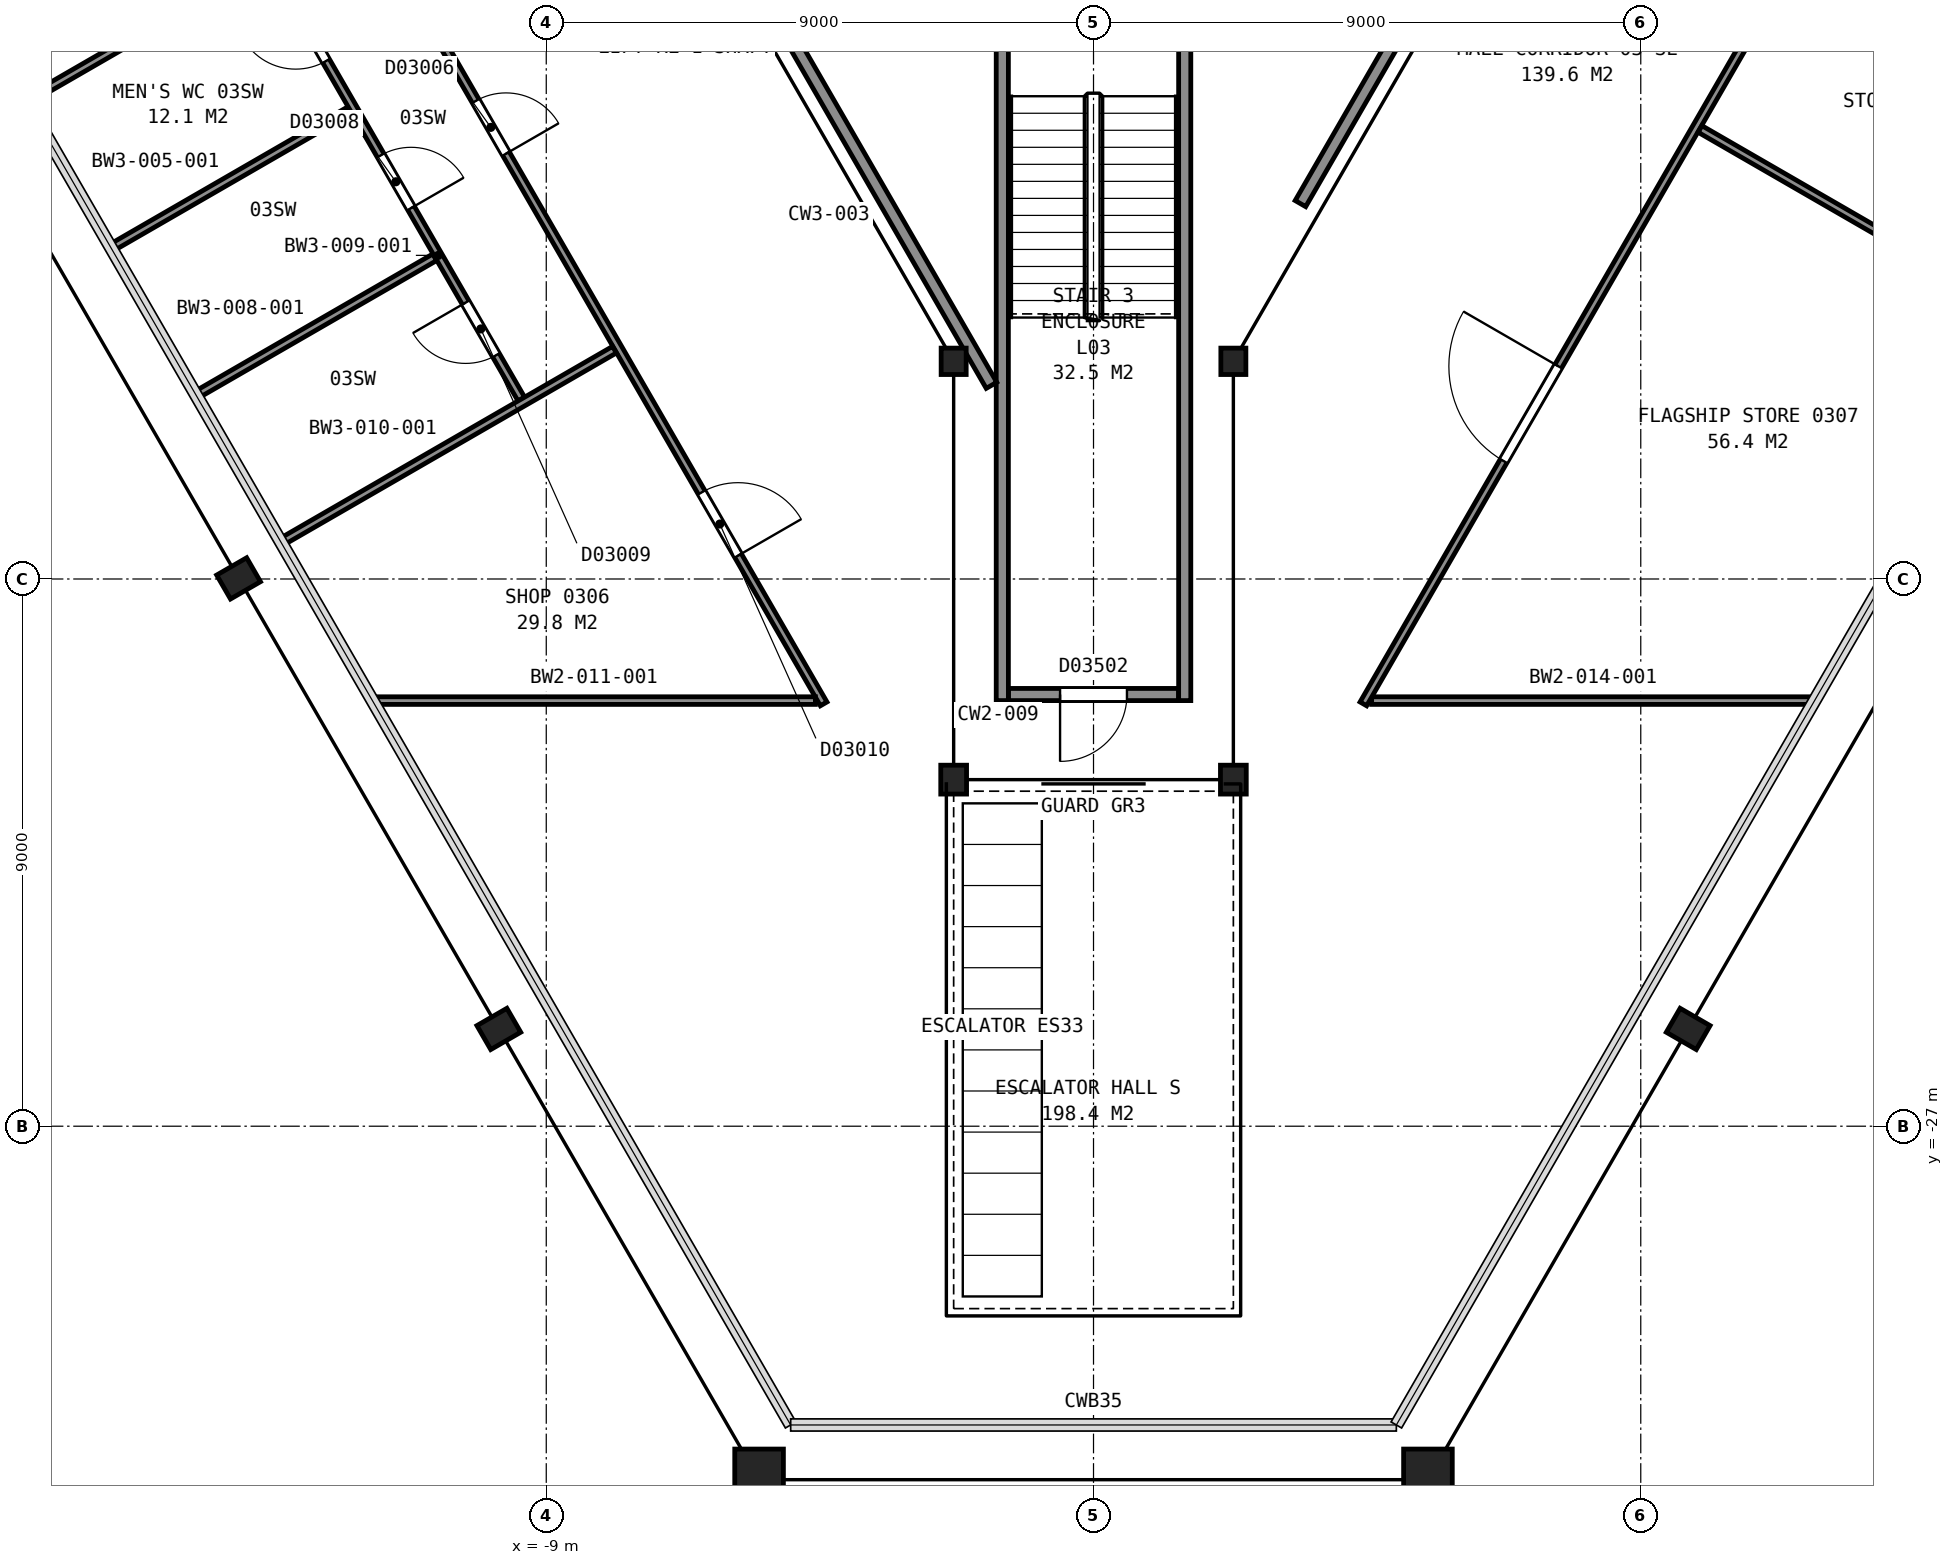
"""IFC4 building model, lengths in metres.
Left out: names, types, materials, properties, quantities, classifications, styles, units other than length and angle.
Written with IfcOpenShell. Run it as: python <this file> out.ifc"""

import sys

from ifc_helpers import new_model, si_unit, direction, frame, frame_2d, origin, origin_2d, place, context, subcontext, project, spatial, rectangle, hollow_rectangle, i_section, extrude, element, fill, save


model = new_model("IFC4")
c1 = context("Model", 3, precision=1e-05, world=origin(), true_north=direction((0.0, 1.0)))
c2 = subcontext(c1, "Body", "Model", "MODEL_VIEW")
j1 = project(units=[si_unit("LENGTHUNIT", "METRE"), si_unit("PLANEANGLEUNIT", "RADIAN")], contexts=[c1])
p1 = place(None, origin())
s1 = spatial("IfcSite", under=j1, at=p1, CompositionType="ELEMENT")
p2 = place(p1, origin())
s2 = spatial("IfcBuilding", under=s1, at=p2, CompositionType="ELEMENT")
p3 = place(p2, frame((0.0, 0.0, 22.4)))
s3 = spatial("IfcBuildingStorey", under=s2, at=p3, CompositionType="ELEMENT", Elevation=22.4)
for number, where, z_axis, x_axis in (
    (1, (-14.06, -17.99, 0.0), (0.0, 0.0, 1.0), (-0.5, 0.866, 0.0)),
    (2, (-9.78, -25.4, 0.0), (0.0, 0.0, 1.0), (-0.5, 0.866, 0.0)),
):
    element("IfcColumn", number, at=place(p3, frame(where, z_axis=z_axis, x_axis=x_axis)), inside=s3, PredefinedType="COLUMN", context=c2, shape_type="SweptSolid", body=[
        extrude(i_section(OverallWidth=0.455, OverallDepth=0.569, WebThickness=0.078, FlangeThickness=0.125, FilletRadius=0.015, at=origin_2d()), origin(), (0.0, 0.0, 1.0), 4.8),
    ])
for number, where, z_axis, x_axis in (
    (3, (-5.5, -32.81, 0.0), (0.0, 0.0, 1.0), (-1.0, 0.0, 0.0)),
    (4, (5.5, -32.81, 0.0), (0.0, 0.0, 1.0), (-1.0, 0.0, 0.0)),
):
    element("IfcColumn", number, at=place(p3, frame(where, z_axis=z_axis, x_axis=x_axis)), inside=s3, PredefinedType="COLUMN", context=c2, shape_type="SweptSolid", body=[
        extrude(hollow_rectangle(XDim=0.8, YDim=1.0, WallThickness=0.075, at=origin_2d()), origin(), (0.0, 0.0, 1.0), 4.8),
    ])
p4 = place(p3, frame((9.78, -25.4, 0.0), z_axis=(0.0, 0.0, 1.0), x_axis=(-0.5, -0.866025403784, 0.0)))
e5 = element("IfcColumn", 5, at=p4, inside=s3, PredefinedType="COLUMN", context=c2, shape_type="SweptSolid", body=[
    extrude(i_section(OverallWidth=0.455, OverallDepth=0.569, WebThickness=0.078, FlangeThickness=0.125, FilletRadius=0.015, at=origin_2d()), origin(), (0.0, 0.0, 1.0), 4.8),
])
p5 = place(p3, frame((-2.3, -14.42, 0.0), z_axis=(0.0, 0.0, 1.0), x_axis=(1.0, 0.0, 0.0)))
e6 = element("IfcColumn", 6, at=p5, inside=s3, PredefinedType="COLUMN", context=c2, shape_type="SweptSolid", body=[
    extrude(i_section(OverallWidth=0.411, OverallDepth=0.434, WebThickness=0.036, FlangeThickness=0.057, FilletRadius=0.015, at=origin_2d()), origin(), (0.0, 0.0, 1.0), 4.8),
])
for number, where, z_axis, x_axis in (
    (7, (-2.3, -21.3, 0.0), (0.0, 0.0, 1.0), (-1.0, 0.0, 0.0)),
    (8, (2.3, -21.3, 0.0), (0.0, 0.0, 1.0), (-1.0, 0.0, 0.0)),
):
    element("IfcColumn", number, at=place(p3, frame(where, z_axis=z_axis, x_axis=x_axis)), inside=s3, PredefinedType="COLUMN", context=c2, shape_type="SweptSolid", body=[
        extrude(i_section(OverallWidth=0.424, OverallDepth=0.475, WebThickness=0.048, FlangeThickness=0.077, FilletRadius=0.015, at=origin_2d()), origin(), (0.0, 0.0, 1.0), 4.8),
    ])
p6 = place(p3, frame((2.3, -14.42, 0.0), z_axis=(0.0, 0.0, 1.0), x_axis=(1.0, 0.0, 0.0)))
e9 = element("IfcColumn", 9, at=p6, inside=s3, PredefinedType="COLUMN", context=c2, shape_type="SweptSolid", body=[
    extrude(i_section(OverallWidth=0.411, OverallDepth=0.434, WebThickness=0.036, FlangeThickness=0.057, FilletRadius=0.015, at=origin_2d()), origin(), (0.0, 0.0, 1.0), 4.8),
])
p7 = place(p3, frame((-1.4, -19.9, 0.0), z_axis=(0.0, 0.0, 1.0), x_axis=(1.0, 0.0, 0.0)))
e10 = element("IfcWall", 10, at=p7, inside=s3, PredefinedType="PARTITIONING", context=c2, shape_type="SweptSolid", body=[
    extrude(rectangle(XDim=2.8, YDim=0.2, at=frame_2d((1.4, 0.0))), origin(), (0.0, 0.0, 1.0), 4.55),
])
p8 = place(p7, frame((0.85, 0.0, 0.0)))
e11 = element("IfcOpeningElement", 11, at=p8, cuts=e10, PredefinedType="OPENING", context=c2, shape_type="SweptSolid", body=[
    extrude(rectangle(XDim=1.1, YDim=2.1, at=frame_2d((0.55, 1.05))), frame((0.0, 0.11, 0.0), z_axis=(0.0, -1.0, 0.0), x_axis=(1.0, 0.0, 0.0)), (0.0, 0.0, 1.0), 0.22),
])
for number, where, z_axis, x_axis in (
    (12, (1.5, -8.0, 0.0), (0.0, 0.0, 1.0), (0.0, -1.0, 0.0)),
    (13, (-1.5, -8.0, 0.0), (0.0, 0.0, 1.0), (0.0, -1.0, 0.0)),
):
    element("IfcWall", number, at=place(p3, frame(where, z_axis=z_axis, x_axis=x_axis)), inside=s3, PredefinedType="PARTITIONING", context=c2, shape_type="SweptSolid", body=[
        extrude(rectangle(XDim=12.0, YDim=0.2, at=frame_2d((6.0, 0.0))), origin(), (0.0, 0.0, 1.0), 4.55),
    ])
p9 = place(p3, frame((-4.914, -9.208, 0.0), z_axis=(0.0, 0.0, 1.0), x_axis=(0.499947703927, -0.866055594831, 0.0)))
e14 = element("IfcWall", 14, at=p9, inside=s3, PredefinedType="PARTITIONING", context=c2, shape_type="SweptSolid", body=[
    extrude(rectangle(XDim=6.474, YDim=0.2, at=frame_2d((3.237, 0.0))), origin(), (0.0, 0.0, 1.0), 4.55),
])
p10 = place(p3, frame((3.403, -11.826, 0.0), z_axis=(0.0, 0.0, 1.0), x_axis=(0.499990831429, 0.866030697196, 0.0)))
e15 = element("IfcWall", 15, at=p10, inside=s3, PredefinedType="PARTITIONING", context=c2, shape_type="SweptSolid", body=[
    extrude(rectangle(XDim=20.526, YDim=0.2, at=frame_2d((10.263, 0.0))), origin(), (0.0, 0.0, 1.0), 4.55),
])
p11 = place(p10, frame((10.0, 0.0, 0.0)))
e16 = element("IfcOpeningElement", 16, at=p11, cuts=e15, PredefinedType="OPENING", context=c2, shape_type="SweptSolid", body=[
    extrude(rectangle(XDim=1.8, YDim=2.1, at=frame_2d((0.9, 1.05))), frame((0.0, 0.11, 0.0), z_axis=(0.0, -1.0, 0.0), x_axis=(1.0, 0.0, 0.0)), (0.0, 0.0, 1.0), 0.22),
])
p12 = place(p3, frame((-4.438, -20.054, 0.0), z_axis=(0.0, 0.0, 1.0), x_axis=(-0.499994028088, 0.866028851642, 0.0)))
e17 = element("IfcWall", 17, at=p12, inside=s3, PredefinedType="PARTITIONING", context=c2, shape_type="SweptSolid", body=[
    extrude(rectangle(XDim=30.297, YDim=0.125, at=frame_2d((15.148, 0.0))), origin(), (0.0, 0.0, 1.0), 3.653),
])
p13 = place(p12, frame((26.285, 0.0, 0.0)))
e18 = element("IfcOpeningElement", 18, at=p13, cuts=e17, PredefinedType="OPENING", context=c2, shape_type="SweptSolid", body=[
    extrude(rectangle(XDim=1.2, YDim=2.1, at=frame_2d((0.6, 1.05))), frame((0.0, 0.073, 0.0), z_axis=(0.0, -1.0, 0.0), x_axis=(1.0, 0.0, 0.0)), (0.0, 0.0, 1.0), 0.145),
])
p14 = place(p12, frame((18.731, 0.0, 0.0)))
e19 = element("IfcOpeningElement", 19, at=p14, cuts=e17, PredefinedType="OPENING", context=c2, shape_type="SweptSolid", body=[
    extrude(rectangle(XDim=1.2, YDim=2.1, at=frame_2d((0.6, 1.05))), frame((0.0, 0.073, 0.0), z_axis=(0.0, -1.0, 0.0), x_axis=(1.0, 0.0, 0.0)), (0.0, 0.0, 1.0), 0.145),
])
p15 = place(p12, frame((10.449, 0.0, 0.0)))
e20 = element("IfcOpeningElement", 20, at=p15, cuts=e17, PredefinedType="OPENING", context=c2, shape_type="SweptSolid", body=[
    extrude(rectangle(XDim=1.0, YDim=2.1, at=frame_2d((0.5, 1.05))), frame((0.0, 0.073, 0.0), z_axis=(0.0, -1.0, 0.0), x_axis=(1.0, 0.0, 0.0)), (0.0, 0.0, 1.0), 0.145),
])
p16 = place(p12, frame((2.816, 0.0, 0.0)))
e21 = element("IfcOpeningElement", 21, at=p16, cuts=e17, PredefinedType="OPENING", context=c2, shape_type="SweptSolid", body=[
    extrude(rectangle(XDim=1.2, YDim=2.1, at=frame_2d((0.6, 1.05))), frame((0.0, 0.073, 0.0), z_axis=(0.0, -1.0, 0.0), x_axis=(1.0, 0.0, 0.0)), (0.0, 0.0, 1.0), 0.145),
])
p17 = place(p3, frame((-17.554, -10.135, 0.0), z_axis=(0.0, 0.0, 1.0), x_axis=(0.866003371142, 0.500038159714, 0.0)))
e22 = element("IfcWall", 22, at=p17, inside=s3, PredefinedType="PARTITIONING", context=c2, shape_type="SweptSolid", body=[
    extrude(rectangle(XDim=6.337, YDim=0.125, at=frame_2d((3.168, 0.0))), origin(), (0.0, 0.0, 1.0), 3.653),
])
p18 = place(p3, frame((-16.157, -12.555, 0.0), z_axis=(0.0, 0.0, 1.0), x_axis=(0.866009042838, 0.50002833692, 0.0)))
e23 = element("IfcWall", 23, at=p18, inside=s3, PredefinedType="PARTITIONING", context=c2, shape_type="SweptSolid", body=[
    extrude(rectangle(XDim=4.537, YDim=0.125, at=frame_2d((2.269, 0.0))), origin(), (0.0, 0.0, 1.0), 4.64),
])
p19 = place(p3, frame((-14.76, -14.975, 0.0), z_axis=(0.0, 0.0, 1.0), x_axis=(0.866030417568, 0.499991315771, 0.0)))
e24 = element("IfcWall", 24, at=p19, inside=s3, PredefinedType="PARTITIONING", context=c2, shape_type="SweptSolid", body=[
    extrude(rectangle(XDim=4.533, YDim=0.125, at=frame_2d((2.266, 0.0))), origin(), (0.0, 0.0, 1.0), 4.64),
])
p20 = place(p3, frame((-9.41, -15.041, 0.0), z_axis=(0.0, 0.0, 1.0), x_axis=(-0.500068128175, 0.865986066391, 0.0)))
e25 = element("IfcWall", 25, at=p20, inside=s3, PredefinedType="PARTITIONING", context=c2, shape_type="SweptSolid", body=[
    extrude(rectangle(XDim=8.253, YDim=0.125, at=frame_2d((4.126, 0.0))), origin(), (0.0, 0.0, 1.0), 4.64),
])
p21 = place(p20, frame((6.421, 0.0, 0.0)))
e26 = element("IfcOpeningElement", 26, at=p21, cuts=e25, PredefinedType="OPENING", context=c2, shape_type="SweptSolid", body=[
    extrude(rectangle(XDim=1.0, YDim=2.1, at=frame_2d((0.5, 1.05))), frame((0.0, 0.073, 0.0), z_axis=(0.0, -1.0, 0.0), x_axis=(1.0, 0.0, 0.0)), (0.0, 0.0, 1.0), 0.145),
])
p22 = place(p20, frame((3.627, 0.0, 0.0)))
e27 = element("IfcOpeningElement", 27, at=p22, cuts=e25, PredefinedType="OPENING", context=c2, shape_type="SweptSolid", body=[
    extrude(rectangle(XDim=1.0, YDim=2.1, at=frame_2d((0.5, 1.05))), frame((0.0, 0.073, 0.0), z_axis=(0.0, -1.0, 0.0), x_axis=(1.0, 0.0, 0.0)), (0.0, 0.0, 1.0), 0.145),
])
p23 = place(p20, frame((0.832, 0.0, 0.0)))
e28 = element("IfcOpeningElement", 28, at=p23, cuts=e25, PredefinedType="OPENING", context=c2, shape_type="SweptSolid", body=[
    extrude(rectangle(XDim=1.0, YDim=2.1, at=frame_2d((0.5, 1.05))), frame((0.0, 0.073, 0.0), z_axis=(0.0, -1.0, 0.0), x_axis=(1.0, 0.0, 0.0)), (0.0, 0.0, 1.0), 0.145),
])
p24 = place(p3, frame((-13.363, -17.395, 0.0), z_axis=(0.0, 0.0, 1.0), x_axis=(0.866044997331, 0.499966061446, 0.0)))
e29 = element("IfcWall", 29, at=p24, inside=s3, PredefinedType="PARTITIONING", context=c2, shape_type="SweptSolid", body=[
    extrude(rectangle(XDim=6.333, YDim=0.125, at=frame_2d((3.167, 0.0))), origin(), (0.0, 0.0, 1.0), 3.653),
])
for number, where, z_axis, x_axis in (
    (30, (-11.859, -20.0, 0.0), (0.0, 0.0, 1.0), (1.0, 0.0, 0.0)),
    (31, (4.574, -20.0, 0.0), (0.0, 0.0, 1.0), (1.0, 0.0, 0.0)),
):
    element("IfcWall", number, at=place(p3, frame(where, z_axis=z_axis, x_axis=x_axis)), inside=s3, PredefinedType="PARTITIONING", context=c2, shape_type="SweptSolid", body=[
        extrude(rectangle(XDim=7.285, YDim=0.125, at=frame_2d((3.643, 0.0))), origin(), (0.0, 0.0, 1.0), 4.64),
    ])
p25 = place(p3, frame((19.586, 6.184, 0.0), z_axis=(0.0, 0.0, 1.0), x_axis=(-0.499994028088, -0.866028851642, 0.0)))
e32 = element("IfcWall", 32, at=p25, inside=s3, PredefinedType="PARTITIONING", context=c2, shape_type="SweptSolid", body=[
    extrude(rectangle(XDim=30.297, YDim=0.125, at=frame_2d((15.148, 0.0))), origin(), (0.0, 0.0, 1.0), 3.653),
])
p26 = place(p25, frame((23.885, 0.0, 0.0)))
e33 = element("IfcOpeningElement", 33, at=p26, cuts=e32, PredefinedType="OPENING", context=c2, shape_type="SweptSolid", body=[
    extrude(rectangle(XDim=1.8, YDim=2.4, at=frame_2d((0.9, 1.2))), frame((0.0, 0.073, 0.0), z_axis=(0.0, -1.0, 0.0), x_axis=(1.0, 0.0, 0.0)), (0.0, 0.0, 1.0), 0.145),
])
p27 = place(p25, frame((16.741, 0.0, 0.0)))
e34 = element("IfcOpeningElement", 34, at=p27, cuts=e32, PredefinedType="OPENING", context=c2, shape_type="SweptSolid", body=[
    extrude(rectangle(XDim=1.0, YDim=2.1, at=frame_2d((0.5, 1.05))), frame((0.0, 0.073, 0.0), z_axis=(0.0, -1.0, 0.0), x_axis=(1.0, 0.0, 0.0)), (0.0, 0.0, 1.0), 0.145),
])
p28 = place(p25, frame((10.349, 0.0, 0.0)))
e35 = element("IfcOpeningElement", 35, at=p28, cuts=e32, PredefinedType="OPENING", context=c2, shape_type="SweptSolid", body=[
    extrude(rectangle(XDim=1.2, YDim=2.1, at=frame_2d((0.6, 1.05))), frame((0.0, 0.073, 0.0), z_axis=(0.0, -1.0, 0.0), x_axis=(1.0, 0.0, 0.0)), (0.0, 0.0, 1.0), 0.145),
])
p29 = place(p25, frame((2.817, 0.0, 0.0)))
e36 = element("IfcOpeningElement", 36, at=p29, cuts=e32, PredefinedType="OPENING", context=c2, shape_type="SweptSolid", body=[
    extrude(rectangle(XDim=1.2, YDim=2.1, at=frame_2d((0.6, 1.05))), frame((0.0, 0.073, 0.0), z_axis=(0.0, -1.0, 0.0), x_axis=(1.0, 0.0, 0.0)), (0.0, 0.0, 1.0), 0.145),
])
p30 = place(p3, frame((9.974, -10.599, 0.0), z_axis=(0.0, 0.0, 1.0), x_axis=(0.866044997331, -0.499966061446, 0.0)))
e37 = element("IfcWall", 37, at=p30, inside=s3, PredefinedType="PARTITIONING", context=c2, shape_type="SweptSolid", body=[
    extrude(rectangle(XDim=6.333, YDim=0.125, at=frame_2d((3.167, 0.0))), origin(), (0.0, 0.0, 1.0), 4.64),
])
p31 = place(p3, frame((12.066, -6.966, 0.0), z_axis=(0.0, 0.0, 1.0), x_axis=(0.866003371142, -0.500038159714, 0.0)))
e38 = element("IfcWall", 38, at=p31, inside=s3, PredefinedType="PARTITIONING", context=c2, shape_type="SweptSolid", body=[
    extrude(rectangle(XDim=6.337, YDim=0.125, at=frame_2d((3.168, 0.0))), origin(), (0.0, 0.0, 1.0), 3.653),
])
p32 = place(p8, origin())
e39 = element("IfcDoor", 39, at=p32, inside=s3, OperationType="SINGLE_SWING_LEFT", PredefinedType="DOOR", context=c2, shape_type="SweptSolid", body=[
    extrude(rectangle(XDim=1.1, YDim=2.1, at=frame_2d((0.55, 1.05))), frame((0.0, 0.025, 0.0), z_axis=(0.0, -1.0, 0.0), x_axis=(1.0, 0.0, 0.0)), (0.0, 0.0, 1.0), 0.05),
])
fill(e11, e39)
p33 = place(p15, origin())
e40 = element("IfcDoor", 40, at=p33, inside=s3, OperationType="SINGLE_SWING_LEFT", PredefinedType="DOOR", context=c2, shape_type="SweptSolid", body=[
    extrude(rectangle(XDim=1.0, YDim=2.1, at=frame_2d((0.5, 1.05))), frame((0.0, 0.025, 0.0), z_axis=(0.0, -1.0, 0.0), x_axis=(1.0, 0.0, 0.0)), (0.0, 0.0, 1.0), 0.05),
])
fill(e20, e40)
p34 = place(p16, origin())
e41 = element("IfcDoor", 41, at=p34, inside=s3, OperationType="SINGLE_SWING_LEFT", PredefinedType="DOOR", context=c2, shape_type="SweptSolid", body=[
    extrude(rectangle(XDim=1.2, YDim=2.1, at=frame_2d((0.6, 1.05))), frame((0.0, 0.025, 0.0), z_axis=(0.0, -1.0, 0.0), x_axis=(1.0, 0.0, 0.0)), (0.0, 0.0, 1.0), 0.05),
])
fill(e21, e41)
p35 = place(p21, origin())
e42 = element("IfcDoor", 42, at=p35, inside=s3, OperationType="SINGLE_SWING_RIGHT", PredefinedType="DOOR", context=c2, shape_type="SweptSolid", body=[
    extrude(rectangle(XDim=1.0, YDim=2.1, at=frame_2d((0.5, 1.05))), frame((0.0, 0.025, 0.0), z_axis=(0.0, -1.0, 0.0), x_axis=(1.0, 0.0, 0.0)), (0.0, 0.0, 1.0), 0.05),
])
fill(e26, e42)
p36 = place(p22, origin())
e43 = element("IfcDoor", 43, at=p36, inside=s3, OperationType="SINGLE_SWING_LEFT", PredefinedType="DOOR", context=c2, shape_type="SweptSolid", body=[
    extrude(rectangle(XDim=1.0, YDim=2.1, at=frame_2d((0.5, 1.05))), frame((0.0, 0.025, 0.0), z_axis=(0.0, -1.0, 0.0), x_axis=(1.0, 0.0, 0.0)), (0.0, 0.0, 1.0), 0.05),
])
fill(e27, e43)
p37 = place(p23, origin())
e44 = element("IfcDoor", 44, at=p37, inside=s3, OperationType="SINGLE_SWING_RIGHT", PredefinedType="DOOR", context=c2, shape_type="SweptSolid", body=[
    extrude(rectangle(XDim=1.0, YDim=2.1, at=frame_2d((0.5, 1.05))), frame((0.0, 0.025, 0.0), z_axis=(0.0, -1.0, 0.0), x_axis=(1.0, 0.0, 0.0)), (0.0, 0.0, 1.0), 0.05),
])
fill(e28, e44)
p38 = place(p26, origin())
e45 = element("IfcDoor", 45, at=p38, inside=s3, OperationType="DOUBLE_DOOR_SINGLE_SWING", PredefinedType="DOOR", context=c2, shape_type="SweptSolid", body=[
    extrude(rectangle(XDim=1.8, YDim=2.4, at=frame_2d((0.9, 1.2))), frame((0.0, 0.025, 0.0), z_axis=(0.0, -1.0, 0.0), x_axis=(1.0, 0.0, 0.0)), (0.0, 0.0, 1.0), 0.05),
])
fill(e33, e45)
save(model, sys.argv[1])
